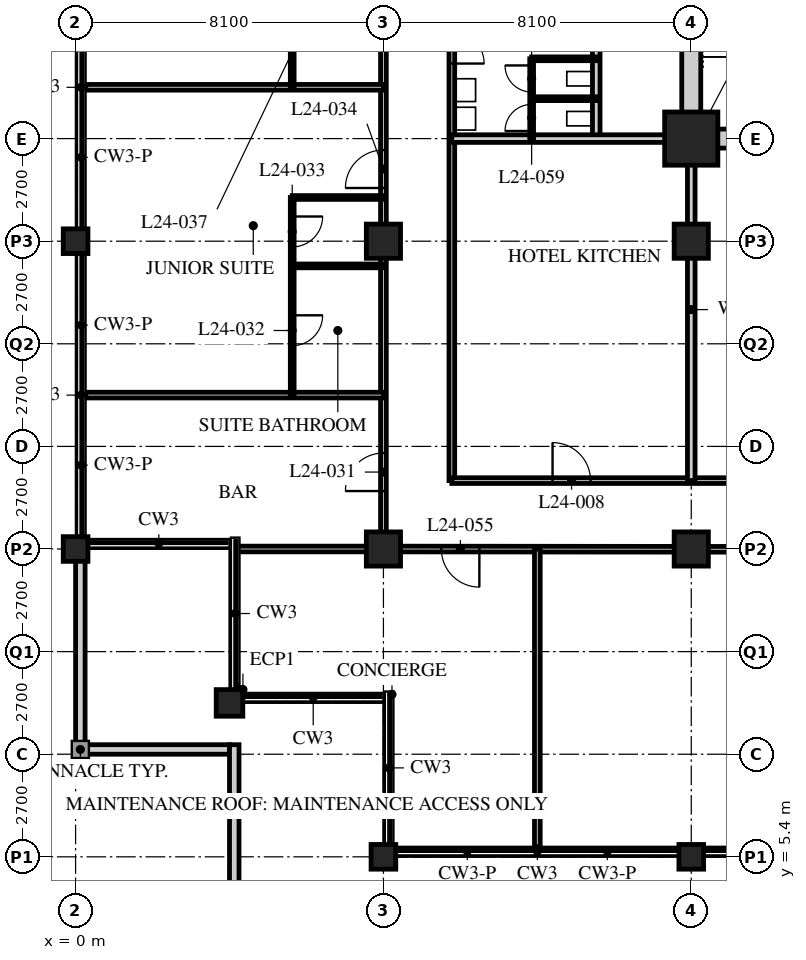
"""IFC4 building model, lengths in metres.
Left out: names, types, materials, properties, quantities, classifications, styles, units other than length and angle.
Written with IfcOpenShell. Run it as: python <this file> out.ifc"""

import sys

from ifc_helpers import new_model, si_unit, direction, frame, frame_2d, origin, origin_2d, place, context, subcontext, project, spatial, rectangle, hollow_rectangle, extrude, element, fill, save


model = new_model("IFC4")
c1 = context("Model", 3, precision=1e-05, world=origin(), true_north=direction((0.0, 1.0)))
c2 = subcontext(c1, "Body", "Model", "MODEL_VIEW")
j1 = project(units=[si_unit("LENGTHUNIT", "METRE"), si_unit("PLANEANGLEUNIT", "RADIAN")], contexts=[c1])
p1 = place(None, origin())
s1 = spatial("IfcSite", under=j1, at=p1, CompositionType="ELEMENT")
p2 = place(p1, origin())
s2 = spatial("IfcBuilding", under=s1, at=p2, CompositionType="ELEMENT")
p3 = place(p2, frame((0.0, 0.0, 98.0)))
s3 = spatial("IfcBuildingStorey", under=s2, at=p3, CompositionType="ELEMENT", Elevation=98.0)
for number, where, z_axis, x_axis in (
    (1, (0.0, 13.5, 0.0), (0.0, 0.0, 1.0), (1.0, 0.0, 0.0)),
    (2, (0.0, 21.6, 0.0), (0.0, 0.0, 1.0), (1.0, 0.0, 0.0)),
):
    element("IfcColumn", number, at=place(p3, frame(where, z_axis=z_axis, x_axis=x_axis)), inside=s3, PredefinedType="COLUMN", context=c2, shape_type="SweptSolid", body=[
        extrude(hollow_rectangle(XDim=0.65, YDim=0.65, WallThickness=0.05, at=origin_2d()), origin(), (0.0, 0.0, 1.0), 5.4),
    ])
p4 = place(p3, frame((4.05, 9.45, 0.0), z_axis=(0.0, 0.0, 1.0), x_axis=(1.0, 0.0, 0.0)))
e3 = element("IfcColumn", 3, at=p4, inside=s3, PredefinedType="COLUMN", context=c2, shape_type="SweptSolid", body=[
    extrude(hollow_rectangle(XDim=0.7, YDim=0.7, WallThickness=0.07, at=origin_2d()), origin(), (0.0, 0.0, 1.0), 5.4),
])
p5 = place(p3, frame((8.1, 5.4, 0.0), z_axis=(0.0, 0.0, 1.0), x_axis=(1.0, 0.0, 0.0)))
e4 = element("IfcColumn", 4, at=p5, inside=s3, PredefinedType="COLUMN", context=c2, shape_type="SweptSolid", body=[
    extrude(hollow_rectangle(XDim=0.65, YDim=0.65, WallThickness=0.05, at=origin_2d()), origin(), (0.0, 0.0, 1.0), 5.4),
])
for number, where, z_axis, x_axis in (
    (5, (8.1, 13.5, 0.0), (0.0, 0.0, 1.0), (1.0, 0.0, 0.0)),
    (6, (8.1, 21.6, 0.0), (0.0, 0.0, 1.0), (1.0, 0.0, 0.0)),
):
    element("IfcColumn", number, at=place(p3, frame(where, z_axis=z_axis, x_axis=x_axis)), inside=s3, PredefinedType="COLUMN", context=c2, shape_type="SweptSolid", body=[
        extrude(hollow_rectangle(XDim=0.9, YDim=0.9, WallThickness=0.1, at=origin_2d()), origin(), (0.0, 0.0, 1.0), 5.4),
    ])
p6 = place(p3, frame((16.2, 5.4, 0.0), z_axis=(0.0, 0.0, 1.0), x_axis=(1.0, 0.0, 0.0)))
e7 = element("IfcColumn", 7, at=p6, inside=s3, PredefinedType="COLUMN", context=c2, shape_type="SweptSolid", body=[
    extrude(hollow_rectangle(XDim=0.65, YDim=0.65, WallThickness=0.05, at=origin_2d()), origin(), (0.0, 0.0, 1.0), 5.4),
])
for number, where, z_axis, x_axis in (
    (8, (16.2, 13.5, 0.0), (0.0, 0.0, 1.0), (1.0, 0.0, 0.0)),
    (9, (16.2, 21.6, 0.0), (0.0, 0.0, 1.0), (1.0, 0.0, 0.0)),
):
    element("IfcColumn", number, at=place(p3, frame(where, z_axis=z_axis, x_axis=x_axis)), inside=s3, PredefinedType="COLUMN", context=c2, shape_type="SweptSolid", body=[
        extrude(hollow_rectangle(XDim=0.9, YDim=0.9, WallThickness=0.1, at=origin_2d()), origin(), (0.0, 0.0, 1.0), 5.4),
    ])
p7 = place(p3, frame((16.2, 24.3, 0.0), z_axis=(0.0, 0.0, 1.0), x_axis=(1.0, 0.0, 0.0)))
e10 = element("IfcColumn", 10, at=p7, inside=s3, PredefinedType="COLUMN", context=c2, shape_type="SweptSolid", body=[
    extrude(hollow_rectangle(XDim=1.4, YDim=1.4, WallThickness=0.12, at=origin_2d()), origin(), (0.0, 0.0, 1.0), 5.4),
])
p8 = place(p3, frame((0.125, 13.5, 0.0), z_axis=(0.0, 0.0, 1.0), x_axis=(0.0, -1.0, 0.0)))
e11 = element("IfcWall", 11, at=p8, inside=s3, PredefinedType="PARAPET", context=c2, shape_type="SweptSolid", body=[
    extrude(rectangle(XDim=5.4, YDim=0.25, at=frame_2d((2.7, 0.0))), origin(), (0.0, 0.0, 1.0), 1.38),
])
p9 = place(p3, frame((0.25, 8.225, 0.0), z_axis=(0.0, 0.0, 1.0), x_axis=(1.0, 0.0, 0.0)))
e12 = element("IfcWall", 12, at=p9, inside=s3, PredefinedType="PARAPET", context=c2, shape_type="SweptSolid", body=[
    extrude(rectangle(XDim=3.8, YDim=0.25, at=frame_2d((1.9, 0.0))), origin(), (0.0, 0.0, 1.0), 1.38),
])
p10 = place(p3, frame((4.175, 8.35, 0.0), z_axis=(0.0, 0.0, 1.0), x_axis=(0.0, -1.0, 0.0)))
e13 = element("IfcWall", 13, at=p10, inside=s3, PredefinedType="PARAPET", context=c2, shape_type="SweptSolid", body=[
    extrude(rectangle(XDim=4.3, YDim=0.25, at=frame_2d((2.15, 0.0))), origin(), (0.0, 0.0, 1.0), 1.38),
])
p11 = place(p3, frame((8.1, 13.5, 0.0), z_axis=(0.0, 0.0, 1.0), x_axis=(0.999999628455, -0.000862027072, 0.0)))
e14 = element("IfcWall", 14, at=p11, inside=s3, PredefinedType="PARTITIONING", context=c2, shape_type="SweptSolid", body=[
    extrude(rectangle(XDim=40.5, YDim=0.15, at=frame_2d((20.25, 0.0))), origin(), (0.0, 0.0, 1.0), 4.49),
])
p12 = place(p11, frame((11.25, 0.0, 0.0)))
e15 = element("IfcOpeningElement", 15, at=p12, cuts=e14, PredefinedType="OPENING", context=c2, shape_type="SweptSolid", body=[
    extrude(rectangle(XDim=1.8, YDim=2.4, at=frame_2d((0.9, 1.2))), frame((0.0, 0.085, 0.0), z_axis=(0.0, -1.0, 0.0), x_axis=(1.0, 0.0, 0.0)), (0.0, 0.0, 1.0), 0.17),
])
p13 = place(p11, frame((25.15, 0.0, 0.0)))
e16 = element("IfcOpeningElement", 16, at=p13, cuts=e14, PredefinedType="OPENING", context=c2, shape_type="SweptSolid", body=[
    extrude(rectangle(XDim=1.8, YDim=2.4, at=frame_2d((0.9, 1.2))), frame((0.0, 0.085, 0.0), z_axis=(0.0, -1.0, 0.0), x_axis=(1.0, 0.0, 0.0)), (0.0, 0.0, 1.0), 0.17),
])
p14 = place(p11, frame((29.875, 0.0, 0.0)))
e17 = element("IfcOpeningElement", 17, at=p14, cuts=e14, PredefinedType="OPENING", context=c2, shape_type="SweptSolid", body=[
    extrude(rectangle(XDim=1.0, YDim=2.1, at=frame_2d((0.5, 1.05))), frame((0.0, 0.085, 0.0), z_axis=(0.0, -1.0, 0.0), x_axis=(1.0, 0.0, 0.0)), (0.0, 0.0, 1.0), 0.17),
])
p15 = place(p11, frame((34.85, 0.0, 0.0)))
e18 = element("IfcOpeningElement", 18, at=p15, cuts=e14, PredefinedType="OPENING", context=c2, shape_type="SweptSolid", body=[
    extrude(rectangle(XDim=1.0, YDim=2.1, at=frame_2d((0.5, 1.05))), frame((0.0, 0.085, 0.0), z_axis=(0.0, -1.0, 0.0), x_axis=(1.0, 0.0, 0.0)), (0.0, 0.0, 1.0), 0.17),
])
p16 = place(p11, frame((1.525, 0.0, 0.0)))
e19 = element("IfcOpeningElement", 19, at=p16, cuts=e14, PredefinedType="OPENING", context=c2, shape_type="SweptSolid", body=[
    extrude(rectangle(XDim=1.0, YDim=2.1, at=frame_2d((0.5, 1.05))), frame((0.0, 0.085, 0.0), z_axis=(0.0, -1.0, 0.0), x_axis=(1.0, 0.0, 0.0)), (0.0, 0.0, 1.0), 0.17),
])
p17 = place(p11, frame((37.975, 0.0, 0.0)))
e20 = element("IfcOpeningElement", 20, at=p17, cuts=e14, PredefinedType="OPENING", context=c2, shape_type="SweptSolid", body=[
    extrude(rectangle(XDim=1.0, YDim=2.1, at=frame_2d((0.5, 1.05))), frame((0.0, 0.085, 0.0), z_axis=(0.0, -1.0, 0.0), x_axis=(1.0, 0.0, 0.0)), (0.0, 0.0, 1.0), 0.17),
])
p18 = place(p3, frame((8.1, 13.5, 0.0), z_axis=(0.0, 0.0, 1.0), x_axis=(0.0, 1.0, 0.0)))
e21 = element("IfcWall", 21, at=p18, inside=s3, PredefinedType="PARTITIONING", context=c2, shape_type="SweptSolid", body=[
    extrude(rectangle(XDim=32.435, YDim=0.15, at=frame_2d((16.218, 0.0))), origin(), (0.0, 0.0, 1.0), 4.49),
])
p19 = place(p18, frame((1.525, 0.0, 0.0)))
e22 = element("IfcOpeningElement", 22, at=p19, cuts=e21, PredefinedType="OPENING", context=c2, shape_type="SweptSolid", body=[
    extrude(rectangle(XDim=1.0, YDim=2.1, at=frame_2d((0.5, 1.05))), frame((0.0, 0.085, 0.0), z_axis=(0.0, -1.0, 0.0), x_axis=(1.0, 0.0, 0.0)), (0.0, 0.0, 1.0), 0.17),
])
p20 = place(p18, frame((9.5, 0.0, 0.0)))
e23 = element("IfcOpeningElement", 23, at=p20, cuts=e21, PredefinedType="OPENING", context=c2, shape_type="SweptSolid", body=[
    extrude(rectangle(XDim=1.0, YDim=2.1, at=frame_2d((0.5, 1.05))), frame((0.0, 0.085, 0.0), z_axis=(0.0, -1.0, 0.0), x_axis=(1.0, 0.0, 0.0)), (0.0, 0.0, 1.0), 0.17),
])
p21 = place(p18, frame((17.6, 0.0, 0.0)))
e24 = element("IfcOpeningElement", 24, at=p21, cuts=e21, PredefinedType="OPENING", context=c2, shape_type="SweptSolid", body=[
    extrude(rectangle(XDim=1.0, YDim=2.1, at=frame_2d((0.5, 1.05))), frame((0.0, 0.085, 0.0), z_axis=(0.0, -1.0, 0.0), x_axis=(1.0, 0.0, 0.0)), (0.0, 0.0, 1.0), 0.17),
])
p22 = place(p18, frame((25.7, 0.0, 0.0)))
e25 = element("IfcOpeningElement", 25, at=p22, cuts=e21, PredefinedType="OPENING", context=c2, shape_type="SweptSolid", body=[
    extrude(rectangle(XDim=1.0, YDim=2.1, at=frame_2d((0.5, 1.05))), frame((0.0, 0.085, 0.0), z_axis=(0.0, -1.0, 0.0), x_axis=(1.0, 0.0, 0.0)), (0.0, 0.0, 1.0), 0.17),
])
p23 = place(p18, frame((28.95, 0.0, 0.0)))
e26 = element("IfcOpeningElement", 26, at=p23, cuts=e21, PredefinedType="OPENING", context=c2, shape_type="SweptSolid", body=[
    extrude(rectangle(XDim=1.0, YDim=2.1, at=frame_2d((0.5, 1.05))), frame((0.0, 0.085, 0.0), z_axis=(0.0, -1.0, 0.0), x_axis=(1.0, 0.0, 0.0)), (0.0, 0.0, 1.0), 0.17),
])
p24 = place(p3, frame((9.9, 44.1, 0.0), z_axis=(0.0, 0.0, 1.0), x_axis=(0.0, -1.0, 0.0)))
e27 = element("IfcWall", 27, at=p24, inside=s3, PredefinedType="PARTITIONING", context=c2, shape_type="SweptSolid", body=[
    extrude(rectangle(XDim=28.8, YDim=0.15, at=frame_2d((14.4, 0.0))), origin(), (0.0, 0.0, 1.0), 5.19),
])
p25 = place(p24, frame((16.975, 0.0, 0.0)))
e28 = element("IfcOpeningElement", 28, at=p25, cuts=e27, PredefinedType="OPENING", context=c2, shape_type="SweptSolid", body=[
    extrude(rectangle(XDim=0.85, YDim=2.1, at=frame_2d((0.425, 1.05))), frame((0.0, 0.085, 0.0), z_axis=(0.0, -1.0, 0.0), x_axis=(1.0, 0.0, 0.0)), (0.0, 0.0, 1.0), 0.17),
])
p26 = place(p24, frame((12.85, 0.0, 0.0)))
e29 = element("IfcOpeningElement", 29, at=p26, cuts=e27, PredefinedType="OPENING", context=c2, shape_type="SweptSolid", body=[
    extrude(rectangle(XDim=1.0, YDim=2.1, at=frame_2d((0.5, 1.05))), frame((0.0, 0.085, 0.0), z_axis=(0.0, -1.0, 0.0), x_axis=(1.0, 0.0, 0.0)), (0.0, 0.0, 1.0), 0.17),
])
p27 = place(p24, frame((8.475, 0.0, 0.0)))
e30 = element("IfcOpeningElement", 30, at=p27, cuts=e27, PredefinedType="OPENING", context=c2, shape_type="SweptSolid", body=[
    extrude(rectangle(XDim=0.85, YDim=2.1, at=frame_2d((0.425, 1.05))), frame((0.0, 0.085, 0.0), z_axis=(0.0, -1.0, 0.0), x_axis=(1.0, 0.0, 0.0)), (0.0, 0.0, 1.0), 0.17),
])
p28 = place(p24, frame((4.35, 0.0, 0.0)))
e31 = element("IfcOpeningElement", 31, at=p28, cuts=e27, PredefinedType="OPENING", context=c2, shape_type="SweptSolid", body=[
    extrude(rectangle(XDim=1.0, YDim=2.1, at=frame_2d((0.5, 1.05))), frame((0.0, 0.085, 0.0), z_axis=(0.0, -1.0, 0.0), x_axis=(1.0, 0.0, 0.0)), (0.0, 0.0, 1.0), 0.17),
])
p29 = place(p3, frame((9.9, 15.3, 0.0), z_axis=(0.0, 0.0, 1.0), x_axis=(1.0, 0.0, 0.0)))
e32 = element("IfcWall", 32, at=p29, inside=s3, PredefinedType="PARTITIONING", context=c2, shape_type="SweptSolid", body=[
    extrude(rectangle(XDim=17.24, YDim=0.15, at=frame_2d((8.62, 0.0))), origin(), (0.0, 0.0, 1.0), 5.19),
])
p30 = place(p29, frame((2.65, 0.0, 0.0)))
e33 = element("IfcOpeningElement", 33, at=p30, cuts=e32, PredefinedType="OPENING", context=c2, shape_type="SweptSolid", body=[
    extrude(rectangle(XDim=1.0, YDim=2.1, at=frame_2d((0.5, 1.05))), frame((0.0, 0.085, 0.0), z_axis=(0.0, -1.0, 0.0), x_axis=(1.0, 0.0, 0.0)), (0.0, 0.0, 1.0), 0.17),
])
p31 = place(p29, frame((11.275, 0.0, 0.0)))
e34 = element("IfcOpeningElement", 34, at=p31, cuts=e32, PredefinedType="OPENING", context=c2, shape_type="SweptSolid", body=[
    extrude(rectangle(XDim=1.0, YDim=2.1, at=frame_2d((0.5, 1.05))), frame((0.0, 0.085, 0.0), z_axis=(0.0, -1.0, 0.0), x_axis=(1.0, 0.0, 0.0)), (0.0, 0.0, 1.0), 0.17),
])
p32 = place(p3, frame((13.7, 24.3, 0.0), z_axis=(0.0, 0.0, 1.0), x_axis=(0.0, 1.0, 0.0)))
e35 = element("IfcWall", 35, at=p32, inside=s3, PredefinedType="SOLIDWALL", context=c2, shape_type="SweptSolid", body=[
    extrude(rectangle(XDim=4.8, YDim=0.2, at=frame_2d((2.4, 0.0))), origin(), (0.0, 0.0, 1.0), 5.19),
])
p33 = place(p3, frame((16.2, 15.3, 0.0), z_axis=(0.0, 0.0, 1.0), x_axis=(0.0, 1.0, 0.0)))
e36 = element("IfcWall", 36, at=p33, inside=s3, PredefinedType="SOLIDWALL", context=c2, shape_type="SweptSolid", body=[
    extrude(rectangle(XDim=9.0, YDim=0.2, at=frame_2d((4.5, 0.0))), origin(), (0.0, 0.0, 1.0), 4.49),
])
p34 = place(p3, frame((9.9, 24.3, 0.0), z_axis=(0.0, 0.0, 1.0), x_axis=(1.0, 0.0, 0.0)))
e37 = element("IfcWall", 37, at=p34, inside=s3, PredefinedType="SOLIDWALL", context=c2, shape_type="SweptSolid", body=[
    extrude(rectangle(XDim=6.3, YDim=0.2, at=frame_2d((3.15, 0.0))), origin(), (0.0, 0.0, 1.0), 5.19),
])
p35 = place(p3, frame((8.1, 17.55, 0.0), z_axis=(0.0, 0.0, 1.0), x_axis=(-1.0, 0.0, 0.0)))
e38 = element("IfcWall", 38, at=p35, inside=s3, PredefinedType="PARTITIONING", context=c2, shape_type="SweptSolid", body=[
    extrude(rectangle(XDim=7.835, YDim=0.15, at=frame_2d((3.917, 0.0))), origin(), (0.0, 0.0, 1.0), 5.19),
])
p36 = place(p3, frame((5.7, 17.55, 0.0), z_axis=(0.0, 0.0, 1.0), x_axis=(0.0, 1.0, 0.0)))
e39 = element("IfcWall", 39, at=p36, inside=s3, PredefinedType="PARTITIONING", context=c2, shape_type="SweptSolid", body=[
    extrude(rectangle(XDim=5.2, YDim=0.1, at=frame_2d((2.6, 0.0))), origin(), (0.0, 0.0, 1.0), 5.19),
])
p37 = place(p36, frame((1.3, 0.0, 0.0)))
e40 = element("IfcOpeningElement", 40, at=p37, cuts=e39, PredefinedType="OPENING", context=c2, shape_type="SweptSolid", body=[
    extrude(rectangle(XDim=0.8, YDim=2.1, at=frame_2d((0.4, 1.05))), frame((0.0, 0.06, 0.0), z_axis=(0.0, -1.0, 0.0), x_axis=(1.0, 0.0, 0.0)), (0.0, 0.0, 1.0), 0.12),
])
p38 = place(p36, frame((3.9, 0.0, 0.0)))
e41 = element("IfcOpeningElement", 41, at=p38, cuts=e39, PredefinedType="OPENING", context=c2, shape_type="SweptSolid", body=[
    extrude(rectangle(XDim=0.8, YDim=2.1, at=frame_2d((0.4, 1.05))), frame((0.0, 0.06, 0.0), z_axis=(0.0, -1.0, 0.0), x_axis=(1.0, 0.0, 0.0)), (0.0, 0.0, 1.0), 0.12),
])
for number, where, z_axis, x_axis in (
    (42, (8.1, 20.95, 0.0), (0.0, 0.0, 1.0), (-1.0, 0.0, 0.0)),
    (43, (8.1, 22.75, 0.0), (0.0, 0.0, 1.0), (-1.0, 0.0, 0.0)),
):
    element("IfcWall", number, at=place(p3, frame(where, z_axis=z_axis, x_axis=x_axis)), inside=s3, PredefinedType="PARTITIONING", context=c2, shape_type="SweptSolid", body=[
        extrude(rectangle(XDim=2.4, YDim=0.1, at=frame_2d((1.2, 0.0))), origin(), (0.0, 0.0, 1.0), 5.19),
    ])
p39 = place(p3, frame((8.1, 25.65, 0.0), z_axis=(0.0, 0.0, 1.0), x_axis=(-1.0, 0.0, 0.0)))
e44 = element("IfcWall", 44, at=p39, inside=s3, PredefinedType="PARTITIONING", context=c2, shape_type="SweptSolid", body=[
    extrude(rectangle(XDim=7.835, YDim=0.15, at=frame_2d((3.917, 0.0))), origin(), (0.0, 0.0, 1.0), 5.19),
])
p40 = place(p3, frame((5.7, 25.65, 0.0), z_axis=(0.0, 0.0, 1.0), x_axis=(0.0, 1.0, 0.0)))
e45 = element("IfcWall", 45, at=p40, inside=s3, PredefinedType="PARTITIONING", context=c2, shape_type="SweptSolid", body=[
    extrude(rectangle(XDim=5.2, YDim=0.1, at=frame_2d((2.6, 0.0))), origin(), (0.0, 0.0, 1.0), 5.19),
])
p41 = place(p40, frame((1.3, 0.0, 0.0)))
e46 = element("IfcOpeningElement", 46, at=p41, cuts=e45, PredefinedType="OPENING", context=c2, shape_type="SweptSolid", body=[
    extrude(rectangle(XDim=0.8, YDim=2.1, at=frame_2d((0.4, 1.05))), frame((0.0, 0.06, 0.0), z_axis=(0.0, -1.0, 0.0), x_axis=(1.0, 0.0, 0.0)), (0.0, 0.0, 1.0), 0.12),
])
p42 = place(p40, frame((3.9, 0.0, 0.0)))
e47 = element("IfcOpeningElement", 47, at=p42, cuts=e45, PredefinedType="OPENING", context=c2, shape_type="SweptSolid", body=[
    extrude(rectangle(XDim=0.8, YDim=2.1, at=frame_2d((0.4, 1.05))), frame((0.0, 0.06, 0.0), z_axis=(0.0, -1.0, 0.0), x_axis=(1.0, 0.0, 0.0)), (0.0, 0.0, 1.0), 0.12),
])
p43 = place(p3, frame((4.22, 13.5, 0.0), z_axis=(0.0, 0.0, 1.0), x_axis=(1.0, 0.0, 0.0)))
e48 = element("IfcWall", 48, at=p43, inside=s3, PredefinedType="PARTITIONING", context=c2, shape_type="SweptSolid", body=[
    extrude(rectangle(XDim=3.88, YDim=0.15, at=frame_2d((1.94, 0.0))), origin(), (0.0, 0.0, 1.0), 4.49),
])
p44 = place(p3, frame((12.15, 13.5, 0.0), z_axis=(0.0, 0.0, 1.0), x_axis=(0.0, -1.0, 0.0)))
e49 = element("IfcWall", 49, at=p44, inside=s3, PredefinedType="PARTITIONING", context=c2, shape_type="SweptSolid", body=[
    extrude(rectangle(XDim=7.834, YDim=0.15, at=frame_2d((3.917, 0.0))), origin(), (0.0, 0.0, 1.0), 5.19),
])
p45 = place(p3, frame((12.0, 24.3, 0.0), z_axis=(0.0, 0.0, 1.0), x_axis=(0.0, 1.0, 0.0)))
e50 = element("IfcWall", 50, at=p45, inside=s3, PredefinedType="PARTITIONING", context=c2, shape_type="SweptSolid", body=[
    extrude(rectangle(XDim=2.1, YDim=0.1, at=frame_2d((1.05, 0.0))), origin(), (0.0, 0.0, 1.0), 5.19),
])
p46 = place(p45, frame((0.2, 0.0, 0.0)))
e51 = element("IfcOpeningElement", 51, at=p46, cuts=e50, PredefinedType="OPENING", context=c2, shape_type="SweptSolid", body=[
    extrude(rectangle(XDim=0.7, YDim=2.0, at=frame_2d((0.35, 1.0))), frame((0.0, 0.06, 0.0), z_axis=(0.0, -1.0, 0.0), x_axis=(1.0, 0.0, 0.0)), (0.0, 0.0, 1.0), 0.12),
])
p47 = place(p45, frame((1.225, 0.0, 0.0)))
e52 = element("IfcOpeningElement", 52, at=p47, cuts=e50, PredefinedType="OPENING", context=c2, shape_type="SweptSolid", body=[
    extrude(rectangle(XDim=0.7, YDim=2.0, at=frame_2d((0.35, 1.0))), frame((0.0, 0.06, 0.0), z_axis=(0.0, -1.0, 0.0), x_axis=(1.0, 0.0, 0.0)), (0.0, 0.0, 1.0), 0.12),
])
for number, where, z_axis, x_axis in (
    (53, (12.0, 25.35, 0.0), (0.0, 0.0, 1.0), (1.0, 0.0, 0.0)),
    (54, (12.0, 26.4, 0.0), (0.0, 0.0, 1.0), (1.0, 0.0, 0.0)),
):
    element("IfcWall", number, at=place(p3, frame(where, z_axis=z_axis, x_axis=x_axis)), inside=s3, PredefinedType="PARTITIONING", context=c2, shape_type="SweptSolid", body=[
        extrude(rectangle(XDim=1.7, YDim=0.1, at=frame_2d((0.85, 0.0))), origin(), (0.0, 0.0, 1.0), 5.19),
    ])
p48 = place(p3, frame((15.95, 24.3, 0.0), z_axis=(0.0, 0.0, 1.0), x_axis=(1.0, 0.0, 0.0)))
e55 = element("IfcWall", 55, at=p48, inside=s3, PredefinedType="SOLIDWALL", context=c2, shape_type="SweptSolid", body=[
    extrude(rectangle(XDim=24.8, YDim=0.5, at=frame_2d((12.4, 0.0))), origin(), (0.0, 0.0, 1.0), 4.49),
])
p49 = place(p48, frame((11.5, 0.0, 0.0)))
e56 = element("IfcOpeningElement", 56, at=p49, cuts=e55, PredefinedType="OPENING", context=c2, shape_type="SweptSolid", body=[
    extrude(rectangle(XDim=1.8, YDim=2.4, at=frame_2d((0.9, 1.2))), frame((0.0, 0.26, 0.0), z_axis=(0.0, -1.0, 0.0), x_axis=(1.0, 0.0, 0.0)), (0.0, 0.0, 1.0), 0.52),
])
p50 = place(p3, frame((16.2, 24.55, 0.0), z_axis=(0.0, 0.0, 1.0), x_axis=(0.0, 1.0, 0.0)))
e57 = element("IfcWall", 57, at=p50, inside=s3, PredefinedType="SOLIDWALL", context=c2, shape_type="SweptSolid", body=[
    extrude(rectangle(XDim=15.7, YDim=0.5, at=frame_2d((7.85, 0.0))), origin(), (0.0, 0.0, 1.0), 4.49),
])
p51 = place(p25, origin())
e58 = element("IfcDoor", 58, at=p51, inside=s3, OperationType="SINGLE_SWING_RIGHT", PredefinedType="DOOR", context=c2, shape_type="SweptSolid", body=[
    extrude(rectangle(XDim=0.85, YDim=2.1, at=frame_2d((0.425, 1.05))), frame((0.0, 0.025, 0.0), z_axis=(0.0, -1.0, 0.0), x_axis=(1.0, 0.0, 0.0)), (0.0, 0.0, 1.0), 0.05),
])
fill(e28, e58)
p52 = place(p30, origin())
e59 = element("IfcDoor", 59, at=p52, inside=s3, OperationType="SINGLE_SWING_LEFT", PredefinedType="DOOR", context=c2, shape_type="SweptSolid", body=[
    extrude(rectangle(XDim=1.0, YDim=2.1, at=frame_2d((0.5, 1.05))), frame((0.0, 0.025, 0.0), z_axis=(0.0, -1.0, 0.0), x_axis=(1.0, 0.0, 0.0)), (0.0, 0.0, 1.0), 0.05),
])
fill(e33, e59)
p53 = place(p19, origin())
e60 = element("IfcDoor", 60, at=p53, inside=s3, OperationType="SINGLE_SWING_LEFT", PredefinedType="DOOR", context=c2, shape_type="SweptSolid", body=[
    extrude(rectangle(XDim=1.0, YDim=2.1, at=frame_2d((0.5, 1.05))), frame((0.0, 0.025, 0.0), z_axis=(0.0, -1.0, 0.0), x_axis=(1.0, 0.0, 0.0)), (0.0, 0.0, 1.0), 0.05),
])
fill(e22, e60)
p54 = place(p37, origin())
e61 = element("IfcDoor", 61, at=p54, inside=s3, OperationType="SINGLE_SWING_LEFT", PredefinedType="DOOR", context=c2, shape_type="SweptSolid", body=[
    extrude(rectangle(XDim=0.8, YDim=2.1, at=frame_2d((0.4, 1.05))), frame((0.0, 0.025, 0.0), z_axis=(0.0, -1.0, 0.0), x_axis=(1.0, 0.0, 0.0)), (0.0, 0.0, 1.0), 0.05),
])
fill(e40, e61)
p55 = place(p38, origin())
e62 = element("IfcDoor", 62, at=p55, inside=s3, OperationType="SINGLE_SWING_LEFT", PredefinedType="DOOR", context=c2, shape_type="SweptSolid", body=[
    extrude(rectangle(XDim=0.8, YDim=2.1, at=frame_2d((0.4, 1.05))), frame((0.0, 0.025, 0.0), z_axis=(0.0, -1.0, 0.0), x_axis=(1.0, 0.0, 0.0)), (0.0, 0.0, 1.0), 0.05),
])
fill(e41, e62)
p56 = place(p20, origin())
e63 = element("IfcDoor", 63, at=p56, inside=s3, OperationType="SINGLE_SWING_LEFT", PredefinedType="DOOR", context=c2, shape_type="SweptSolid", body=[
    extrude(rectangle(XDim=1.0, YDim=2.1, at=frame_2d((0.5, 1.05))), frame((0.0, 0.025, 0.0), z_axis=(0.0, -1.0, 0.0), x_axis=(1.0, 0.0, 0.0)), (0.0, 0.0, 1.0), 0.05),
])
fill(e23, e63)
p57 = place(p16, origin())
e64 = element("IfcDoor", 64, at=p57, inside=s3, OperationType="SINGLE_SWING_LEFT", PredefinedType="DOOR", context=c2, shape_type="SweptSolid", body=[
    extrude(rectangle(XDim=1.0, YDim=2.1, at=frame_2d((0.5, 1.05))), frame((0.0, 0.025, 0.0), z_axis=(0.0, -1.0, 0.0), x_axis=(1.0, 0.0, 0.0)), (0.0, 0.0, 1.0), 0.05),
])
fill(e19, e64)
p58 = place(p46, origin())
e65 = element("IfcDoor", 65, at=p58, inside=s3, OperationType="SINGLE_SWING_LEFT", PredefinedType="DOOR", context=c2, shape_type="SweptSolid", body=[
    extrude(rectangle(XDim=0.7, YDim=2.0, at=frame_2d((0.35, 1.0))), frame((0.0, 0.025, 0.0), z_axis=(0.0, -1.0, 0.0), x_axis=(1.0, 0.0, 0.0)), (0.0, 0.0, 1.0), 0.05),
])
fill(e51, e65)
p59 = place(p47, origin())
e66 = element("IfcDoor", 66, at=p59, inside=s3, OperationType="SINGLE_SWING_RIGHT", PredefinedType="DOOR", context=c2, shape_type="SweptSolid", body=[
    extrude(rectangle(XDim=0.7, YDim=2.0, at=frame_2d((0.35, 1.0))), frame((0.0, 0.025, 0.0), z_axis=(0.0, -1.0, 0.0), x_axis=(1.0, 0.0, 0.0)), (0.0, 0.0, 1.0), 0.05),
])
fill(e52, e66)
save(model, sys.argv[1])
